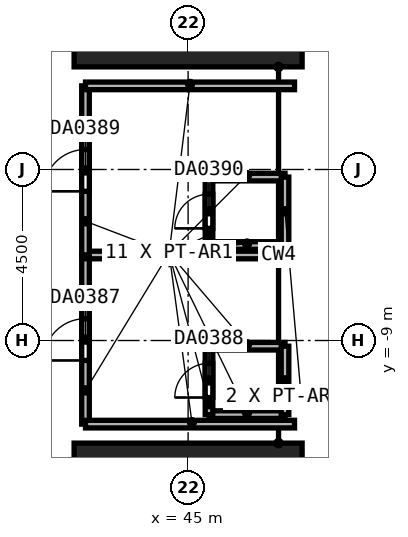
"""IFC4 building model, lengths in metres.
Left out: names, types, materials, properties, quantities, classifications, styles, units other than length and angle.
Written with IfcOpenShell. Run it as: python <this file> out.ifc"""

import sys

from ifc_helpers import new_model, si_unit, direction, frame, frame_2d, origin, origin_2d, place, context, subcontext, project, spatial, rectangle, extrude, element, fill, save


model = new_model("IFC4")
c1 = context("Model", 3, precision=1e-05, world=origin(), true_north=direction((0.0, 1.0)))
c2 = subcontext(c1, "Body", "Model", "MODEL_VIEW")
j1 = project(units=[si_unit("LENGTHUNIT", "METRE"), si_unit("PLANEANGLEUNIT", "RADIAN")], contexts=[c1])
p1 = place(None, origin())
s1 = spatial("IfcSite", under=j1, at=p1, CompositionType="ELEMENT")
p2 = place(p1, origin())
s2 = spatial("IfcBuilding", under=s1, at=p2, CompositionType="ELEMENT")
p3 = place(p2, frame((0.0, 0.0, 25.0)))
s3 = spatial("IfcBuildingStorey", under=s2, at=p3, CompositionType="ELEMENT", Elevation=25.0)
for number, where, z_axis, x_axis in (
    (1, (45.0, -13.5, 0.0), (0.0, 0.0, 1.0), (0.0, 1.0, 0.0)),
    (2, (45.0, 0.0, 0.0), (0.0, 0.0, 1.0), (0.0, 1.0, 0.0)),
):
    element("IfcColumn", number, at=place(p3, frame(where, z_axis=z_axis, x_axis=x_axis)), inside=s3, PredefinedType="COLUMN", context=c2, shape_type="SweptSolid", body=[
        extrude(rectangle(XDim=3.6, YDim=6.0, at=origin_2d()), origin(), (0.0, 0.0, 1.0), 6.0),
    ])
p4 = place(p3, frame((42.3, -11.2, 0.0), z_axis=(0.0, 0.0, 1.0), x_axis=(0.0, 1.0, 0.0)))
e3 = element("IfcWall", 3, at=p4, inside=s3, PredefinedType="PARTITIONING", context=c2, shape_type="SweptSolid", body=[
    extrude(rectangle(XDim=4.45, YDim=0.2, at=frame_2d((2.225, 0.0))), origin(), (0.0, 0.0, 1.0), 5.7),
])
p5 = place(p4, frame((1.675, 0.0, 0.0)))
e4 = element("IfcOpeningElement", 4, at=p5, cuts=e3, PredefinedType="OPENING", context=c2, shape_type="SweptSolid", body=[
    extrude(rectangle(XDim=1.1, YDim=2.4, at=frame_2d((0.55, 1.2))), frame((0.0, 0.1, 0.0), z_axis=(0.0, -1.0, 0.0), x_axis=(1.0, 0.0, 0.0)), (0.0, 0.0, 1.0), 0.2),
])
for number, where, z_axis, x_axis in (
    (5, (42.3, -11.2, 0.0), (0.0, 0.0, 1.0), (1.0, 0.0, 0.0)),
    (6, (42.3, -6.75, 0.0), (0.0, 0.0, 1.0), (1.0, 0.0, 0.0)),
):
    element("IfcWall", number, at=place(p3, frame(where, z_axis=z_axis, x_axis=x_axis)), inside=s3, PredefinedType="PARTITIONING", context=c2, shape_type="SweptSolid", body=[
        extrude(rectangle(XDim=5.5, YDim=0.2, at=frame_2d((2.75, 0.0))), origin(), (0.0, 0.0, 1.0), 5.7),
    ])
for number, where, z_axis, x_axis in (
    (7, (45.55, -10.95, 0.0), (0.0, 0.0, 1.0), (1.0, 0.0, 0.0)),
    (8, (47.55, -9.15, 0.0), (0.0, 0.0, 1.0), (-1.0, 0.0, 0.0)),
):
    element("IfcWall", number, at=place(p3, frame(where, z_axis=z_axis, x_axis=x_axis)), inside=s3, PredefinedType="PARTITIONING", context=c2, shape_type="SweptSolid", body=[
        extrude(rectangle(XDim=2.0, YDim=0.2, at=frame_2d((1.0, 0.0))), origin(), (0.0, 0.0, 1.0), 5.7),
    ])
p6 = place(p3, frame((47.55, -10.95, 0.0), z_axis=(0.0, 0.0, 1.0), x_axis=(0.0, 1.0, 0.0)))
e9 = element("IfcWall", 9, at=p6, inside=s3, PredefinedType="PARTITIONING", context=c2, shape_type="SweptSolid", body=[
    extrude(rectangle(XDim=1.8, YDim=0.2, at=frame_2d((0.9, 0.0))), origin(), (0.0, 0.0, 1.0), 4.5),
])
p7 = place(p3, frame((45.55, -10.95, 0.0), z_axis=(0.0, 0.0, 1.0), x_axis=(0.0, 1.0, 0.0)))
e10 = element("IfcWall", 10, at=p7, inside=s3, PredefinedType="PARTITIONING", context=c2, shape_type="SweptSolid", body=[
    extrude(rectangle(XDim=1.8, YDim=0.2, at=frame_2d((0.9, 0.0))), origin(), (0.0, 0.0, 1.0), 5.7),
])
p8 = place(p7, frame((0.45, 0.0, 0.0)))
e11 = element("IfcOpeningElement", 11, at=p8, cuts=e10, PredefinedType="OPENING", context=c2, shape_type="SweptSolid", body=[
    extrude(rectangle(XDim=0.9, YDim=2.1, at=frame_2d((0.45, 1.05))), frame((0.0, 0.1, 0.0), z_axis=(0.0, -1.0, 0.0), x_axis=(1.0, 0.0, 0.0)), (0.0, 0.0, 1.0), 0.2),
])
p9 = place(p3, frame((42.3, -6.75, 0.0), z_axis=(0.0, 0.0, 1.0), x_axis=(0.0, 1.0, 0.0)))
e12 = element("IfcWall", 12, at=p9, inside=s3, PredefinedType="PARTITIONING", context=c2, shape_type="SweptSolid", body=[
    extrude(rectangle(XDim=4.45, YDim=0.2, at=frame_2d((2.225, 0.0))), origin(), (0.0, 0.0, 1.0), 5.7),
])
p10 = place(p9, frame((1.675, 0.0, 0.0)))
e13 = element("IfcOpeningElement", 13, at=p10, cuts=e12, PredefinedType="OPENING", context=c2, shape_type="SweptSolid", body=[
    extrude(rectangle(XDim=1.1, YDim=2.4, at=frame_2d((0.55, 1.2))), frame((0.0, 0.1, 0.0), z_axis=(0.0, -1.0, 0.0), x_axis=(1.0, 0.0, 0.0)), (0.0, 0.0, 1.0), 0.2),
])
p11 = place(p3, frame((42.3, -2.3, 0.0), z_axis=(0.0, 0.0, 1.0), x_axis=(1.0, 0.0, 0.0)))
e14 = element("IfcWall", 14, at=p11, inside=s3, PredefinedType="PARTITIONING", context=c2, shape_type="SweptSolid", body=[
    extrude(rectangle(XDim=5.5, YDim=0.2, at=frame_2d((2.75, 0.0))), origin(), (0.0, 0.0, 1.0), 5.7),
])
for number, where, z_axis, x_axis in (
    (15, (45.55, -6.5, 0.0), (0.0, 0.0, 1.0), (1.0, 0.0, 0.0)),
    (16, (47.55, -4.7, 0.0), (0.0, 0.0, 1.0), (-1.0, 0.0, 0.0)),
):
    element("IfcWall", number, at=place(p3, frame(where, z_axis=z_axis, x_axis=x_axis)), inside=s3, PredefinedType="PARTITIONING", context=c2, shape_type="SweptSolid", body=[
        extrude(rectangle(XDim=2.0, YDim=0.2, at=frame_2d((1.0, 0.0))), origin(), (0.0, 0.0, 1.0), 5.7),
    ])
p12 = place(p3, frame((47.55, -6.5, 0.0), z_axis=(0.0, 0.0, 1.0), x_axis=(0.0, 1.0, 0.0)))
e17 = element("IfcWall", 17, at=p12, inside=s3, PredefinedType="PARTITIONING", context=c2, shape_type="SweptSolid", body=[
    extrude(rectangle(XDim=1.8, YDim=0.2, at=frame_2d((0.9, 0.0))), origin(), (0.0, 0.0, 1.0), 4.5),
])
p13 = place(p3, frame((45.55, -6.5, 0.0), z_axis=(0.0, 0.0, 1.0), x_axis=(0.0, 1.0, 0.0)))
e18 = element("IfcWall", 18, at=p13, inside=s3, PredefinedType="PARTITIONING", context=c2, shape_type="SweptSolid", body=[
    extrude(rectangle(XDim=1.8, YDim=0.2, at=frame_2d((0.9, 0.0))), origin(), (0.0, 0.0, 1.0), 5.7),
])
p14 = place(p13, frame((0.45, 0.0, 0.0)))
e19 = element("IfcOpeningElement", 19, at=p14, cuts=e18, PredefinedType="OPENING", context=c2, shape_type="SweptSolid", body=[
    extrude(rectangle(XDim=0.9, YDim=2.1, at=frame_2d((0.45, 1.05))), frame((0.0, 0.1, 0.0), z_axis=(0.0, -1.0, 0.0), x_axis=(1.0, 0.0, 0.0)), (0.0, 0.0, 1.0), 0.2),
])
p15 = place(p5, origin())
e20 = element("IfcDoor", 20, at=p15, inside=s3, OperationType="DOUBLE_DOOR_SINGLE_SWING", PredefinedType="DOOR", context=c2, shape_type="SweptSolid", body=[
    extrude(rectangle(XDim=1.1, YDim=2.4, at=frame_2d((0.55, 1.2))), frame((0.0, 0.025, 0.0), z_axis=(0.0, -1.0, 0.0), x_axis=(1.0, 0.0, 0.0)), (0.0, 0.0, 1.0), 0.05),
])
fill(e4, e20)
p16 = place(p8, origin())
e21 = element("IfcDoor", 21, at=p16, inside=s3, OperationType="SINGLE_SWING_LEFT", PredefinedType="DOOR", context=c2, shape_type="SweptSolid", body=[
    extrude(rectangle(XDim=0.9, YDim=2.1, at=frame_2d((0.45, 1.05))), frame((0.0, 0.025, 0.0), z_axis=(0.0, -1.0, 0.0), x_axis=(1.0, 0.0, 0.0)), (0.0, 0.0, 1.0), 0.05),
])
fill(e11, e21)
p17 = place(p10, origin())
e22 = element("IfcDoor", 22, at=p17, inside=s3, OperationType="DOUBLE_DOOR_SINGLE_SWING", PredefinedType="DOOR", context=c2, shape_type="SweptSolid", body=[
    extrude(rectangle(XDim=1.1, YDim=2.4, at=frame_2d((0.55, 1.2))), frame((0.0, 0.025, 0.0), z_axis=(0.0, -1.0, 0.0), x_axis=(1.0, 0.0, 0.0)), (0.0, 0.0, 1.0), 0.05),
])
fill(e13, e22)
p18 = place(p14, origin())
e23 = element("IfcDoor", 23, at=p18, inside=s3, OperationType="SINGLE_SWING_LEFT", PredefinedType="DOOR", context=c2, shape_type="SweptSolid", body=[
    extrude(rectangle(XDim=0.9, YDim=2.1, at=frame_2d((0.45, 1.05))), frame((0.0, 0.025, 0.0), z_axis=(0.0, -1.0, 0.0), x_axis=(1.0, 0.0, 0.0)), (0.0, 0.0, 1.0), 0.05),
])
fill(e19, e23)
save(model, sys.argv[1])
